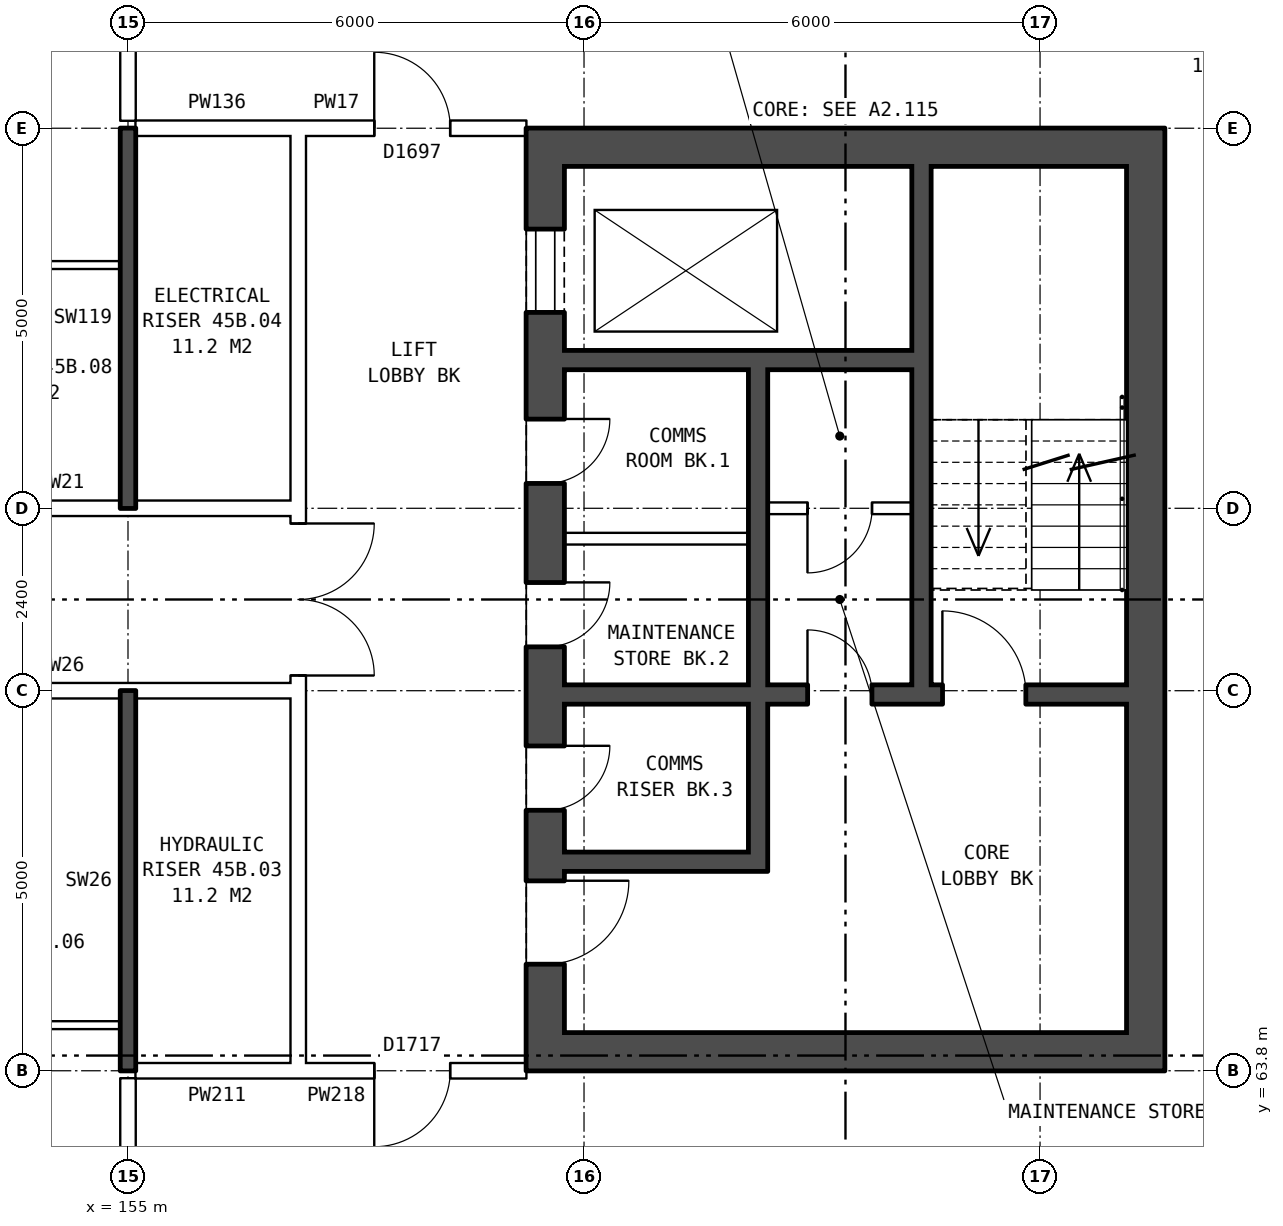
"""IFC4 building model, lengths in metres.
Left out: names, types, materials, properties, quantities, classifications, styles, units other than length and angle.
Written with IfcOpenShell. Run it as: python <this file> out.ifc"""

import sys

from ifc_helpers import new_model, si_unit, direction, frame, frame_2d, origin, place, context, subcontext, project, spatial, rectangle, extrude, element, fill, save


model = new_model("IFC4")
c1 = context("Model", 3, precision=1e-05, world=origin(), true_north=direction((0.0, 1.0)))
c2 = subcontext(c1, "Body", "Model", "MODEL_VIEW")
j1 = project(units=[si_unit("LENGTHUNIT", "METRE"), si_unit("PLANEANGLEUNIT", "RADIAN")], contexts=[c1])
p1 = place(None, origin())
s1 = spatial("IfcSite", under=j1, at=p1, CompositionType="ELEMENT")
p2 = place(p1, origin())
s2 = spatial("IfcBuilding", under=s1, at=p2, CompositionType="ELEMENT")
p3 = place(p2, frame((0.0, 0.0, 160.9)))
s3 = spatial("IfcBuildingStorey", under=s2, at=p3, CompositionType="ELEMENT", Elevation=160.9)
p4 = place(p3, frame((160.49, 76.2, 0.0), z_axis=(0.0, 0.0, 1.0), x_axis=(0.0, -1.0, 0.0)))
e1 = element("IfcWall", 1, at=p4, inside=s3, PredefinedType="SHEAR", context=c2, shape_type="SweptSolid", body=[
    extrude(rectangle(XDim=12.4, YDim=0.5, at=frame_2d((6.2, 0.0))), origin(), (0.0, 0.0, 1.0), 2.85),
])
p5 = place(p4, frame((1.325, 0.0, 0.0)))
e2 = element("IfcOpeningElement", 2, at=p5, cuts=e1, PredefinedType="OPENING", context=c2, shape_type="SweptSolid", body=[
    extrude(rectangle(XDim=1.1, YDim=2.1, at=frame_2d((0.55, 1.05))), frame((0.0, 0.26, 0.0), z_axis=(0.0, -1.0, 0.0), x_axis=(1.0, 0.0, 0.0)), (0.0, 0.0, 1.0), 0.52),
])
p6 = place(p4, frame((3.825, 0.0, 0.0)))
e3 = element("IfcOpeningElement", 3, at=p6, cuts=e1, PredefinedType="OPENING", context=c2, shape_type="SweptSolid", body=[
    extrude(rectangle(XDim=0.85, YDim=2.1, at=frame_2d((0.425, 1.05))), frame((0.0, 0.26, 0.0), z_axis=(0.0, -1.0, 0.0), x_axis=(1.0, 0.0, 0.0)), (0.0, 0.0, 1.0), 0.52),
])
p7 = place(p4, frame((5.975, 0.0, 0.0)))
e4 = element("IfcOpeningElement", 4, at=p7, cuts=e1, PredefinedType="OPENING", context=c2, shape_type="SweptSolid", body=[
    extrude(rectangle(XDim=0.85, YDim=2.1, at=frame_2d((0.425, 1.05))), frame((0.0, 0.26, 0.0), z_axis=(0.0, -1.0, 0.0), x_axis=(1.0, 0.0, 0.0)), (0.0, 0.0, 1.0), 0.52),
])
p8 = place(p4, frame((9.9, 0.0, 0.0)))
e5 = element("IfcOpeningElement", 5, at=p8, cuts=e1, PredefinedType="OPENING", context=c2, shape_type="SweptSolid", body=[
    extrude(rectangle(XDim=1.1, YDim=2.1, at=frame_2d((0.55, 1.05))), frame((0.0, 0.26, 0.0), z_axis=(0.0, -1.0, 0.0), x_axis=(1.0, 0.0, 0.0)), (0.0, 0.0, 1.0), 0.52),
])
p9 = place(p4, frame((8.125, 0.0, 0.0)))
e6 = element("IfcOpeningElement", 6, at=p9, cuts=e1, PredefinedType="OPENING", context=c2, shape_type="SweptSolid", body=[
    extrude(rectangle(XDim=0.85, YDim=2.1, at=frame_2d((0.425, 1.05))), frame((0.0, 0.26, 0.0), z_axis=(0.0, -1.0, 0.0), x_axis=(1.0, 0.0, 0.0)), (0.0, 0.0, 1.0), 0.52),
])
p10 = place(p3, frame((168.39, 76.2, 0.0), z_axis=(0.0, 0.0, 1.0), x_axis=(0.0, -1.0, 0.0)))
e7 = element("IfcWall", 7, at=p10, inside=s3, PredefinedType="SHEAR", context=c2, shape_type="SweptSolid", body=[
    extrude(rectangle(XDim=12.4, YDim=0.5, at=frame_2d((6.2, 0.0))), origin(), (0.0, 0.0, 1.0), 2.85),
])
for number, where, z_axis, x_axis in (
    (8, (160.74, 75.95, 0.0), (0.0, 0.0, 1.0), (1.0, 0.0, 0.0)),
    (9, (160.74, 64.05, 0.0), (0.0, 0.0, 1.0), (1.0, 0.0, 0.0)),
):
    element("IfcWall", number, at=place(p3, frame(where, z_axis=z_axis, x_axis=x_axis)), inside=s3, PredefinedType="SHEAR", context=c2, shape_type="SweptSolid", body=[
        extrude(rectangle(XDim=7.4, YDim=0.5, at=frame_2d((3.7, 0.0))), origin(), (0.0, 0.0, 1.0), 2.85),
    ])
p11 = place(p3, frame((160.74, 73.15, 0.0), z_axis=(0.0, 0.0, 1.0), x_axis=(1.0, 0.0, 0.0)))
e10 = element("IfcWall", 10, at=p11, inside=s3, PredefinedType="SHEAR", context=c2, shape_type="SweptSolid", body=[
    extrude(rectangle(XDim=4.575, YDim=0.25, at=frame_2d((2.288, 0.0))), origin(), (0.0, 0.0, 1.0), 2.85),
])
p12 = place(p3, frame((163.415, 71.2, 0.0), z_axis=(0.0, 0.0, 1.0), x_axis=(1.0, 0.0, 0.0)))
e11 = element("IfcWall", 11, at=p12, inside=s3, PredefinedType="PARTITIONING", context=c2, shape_type="SweptSolid", body=[
    extrude(rectangle(XDim=1.9, YDim=0.15, at=frame_2d((0.95, 0.0))), origin(), (0.0, 0.0, 1.0), 2.85),
])
p13 = place(p12, frame((0.525, 0.0, 0.0)))
e12 = element("IfcOpeningElement", 12, at=p13, cuts=e11, PredefinedType="OPENING", context=c2, shape_type="SweptSolid", body=[
    extrude(rectangle(XDim=0.85, YDim=2.1, at=frame_2d((0.425, 1.05))), frame((0.0, 0.085, 0.0), z_axis=(0.0, -1.0, 0.0), x_axis=(1.0, 0.0, 0.0)), (0.0, 0.0, 1.0), 0.17),
])
p14 = place(p3, frame((160.74, 70.8, 0.0), z_axis=(0.0, 0.0, 1.0), x_axis=(1.0, 0.0, 0.0)))
e13 = element("IfcWall", 13, at=p14, inside=s3, PredefinedType="PARTITIONING", context=c2, shape_type="SweptSolid", body=[
    extrude(rectangle(XDim=2.425, YDim=0.15, at=frame_2d((1.212, 0.0))), origin(), (0.0, 0.0, 1.0), 2.85),
])
p15 = place(p3, frame((160.74, 68.75, 0.0), z_axis=(0.0, 0.0, 1.0), x_axis=(1.0, 0.0, 0.0)))
e14 = element("IfcWall", 14, at=p15, inside=s3, PredefinedType="SHEAR", context=c2, shape_type="SweptSolid", body=[
    extrude(rectangle(XDim=7.4, YDim=0.25, at=frame_2d((3.7, 0.0))), origin(), (0.0, 0.0, 1.0), 2.85),
])
p16 = place(p15, frame((4.975, 0.0, 0.0)))
e15 = element("IfcOpeningElement", 15, at=p16, cuts=e14, PredefinedType="OPENING", context=c2, shape_type="SweptSolid", body=[
    extrude(rectangle(XDim=1.1, YDim=2.1, at=frame_2d((0.55, 1.05))), frame((0.0, 0.135, 0.0), z_axis=(0.0, -1.0, 0.0), x_axis=(1.0, 0.0, 0.0)), (0.0, 0.0, 1.0), 0.27),
])
p17 = place(p15, frame((3.2, 0.0, 0.0)))
e16 = element("IfcOpeningElement", 16, at=p17, cuts=e14, PredefinedType="OPENING", context=c2, shape_type="SweptSolid", body=[
    extrude(rectangle(XDim=0.85, YDim=2.1, at=frame_2d((0.425, 1.05))), frame((0.0, 0.135, 0.0), z_axis=(0.0, -1.0, 0.0), x_axis=(1.0, 0.0, 0.0)), (0.0, 0.0, 1.0), 0.27),
])
p18 = place(p3, frame((160.74, 66.55, 0.0), z_axis=(0.0, 0.0, 1.0), x_axis=(1.0, 0.0, 0.0)))
e17 = element("IfcWall", 17, at=p18, inside=s3, PredefinedType="SHEAR", context=c2, shape_type="SweptSolid", body=[
    extrude(rectangle(XDim=2.425, YDim=0.25, at=frame_2d((1.212, 0.0))), origin(), (0.0, 0.0, 1.0), 2.85),
])
p19 = place(p3, frame((163.29, 73.025, 0.0), z_axis=(0.0, 0.0, 1.0), x_axis=(0.0, -1.0, 0.0)))
e18 = element("IfcWall", 18, at=p19, inside=s3, PredefinedType="SHEAR", context=c2, shape_type="SweptSolid", body=[
    extrude(rectangle(XDim=4.15, YDim=0.25, at=frame_2d((2.075, 0.0))), origin(), (0.0, 0.0, 1.0), 2.85),
])
p20 = place(p3, frame((163.29, 68.625, 0.0), z_axis=(0.0, 0.0, 1.0), x_axis=(0.0, -1.0, 0.0)))
e19 = element("IfcWall", 19, at=p20, inside=s3, PredefinedType="SHEAR", context=c2, shape_type="SweptSolid", body=[
    extrude(rectangle(XDim=2.2, YDim=0.25, at=frame_2d((1.1, 0.0))), origin(), (0.0, 0.0, 1.0), 2.85),
])
p21 = place(p3, frame((165.44, 75.7, 0.0), z_axis=(0.0, 0.0, 1.0), x_axis=(0.0, -1.0, 0.0)))
e20 = element("IfcWall", 20, at=p21, inside=s3, PredefinedType="SHEAR", context=c2, shape_type="SweptSolid", body=[
    extrude(rectangle(XDim=6.825, YDim=0.25, at=frame_2d((3.413, 0.0))), origin(), (0.0, 0.0, 1.0), 2.85),
])
p22 = place(p3, frame((157.24, 63.9, 0.0), z_axis=(0.0, 0.0, 1.0), x_axis=(0.0, 1.0, 0.0)))
e21 = element("IfcWall", 21, at=p22, inside=s3, PredefinedType="PARTITIONING", context=c2, shape_type="SweptSolid", body=[
    extrude(rectangle(XDim=12.2, YDim=0.2, at=frame_2d((6.1, 0.0))), origin(), (0.0, 0.0, 1.0), 2.85),
])
p23 = place(p22, frame((5.1, 0.0, 0.0)))
e22 = element("IfcOpeningElement", 22, at=p23, cuts=e21, PredefinedType="OPENING", context=c2, shape_type="SweptSolid", body=[
    extrude(rectangle(XDim=2.0, YDim=2.1, at=frame_2d((1.0, 1.05))), frame((0.0, 0.11, 0.0), z_axis=(0.0, -1.0, 0.0), x_axis=(1.0, 0.0, 0.0)), (0.0, 0.0, 1.0), 0.22),
])
p24 = place(p3, frame((155.1, 63.8, 0.0), z_axis=(0.0, 0.0, 1.0), x_axis=(1.0, 0.0, 0.0)))
e23 = element("IfcWall", 23, at=p24, inside=s3, PredefinedType="PARTITIONING", context=c2, shape_type="SweptSolid", body=[
    extrude(rectangle(XDim=2.14, YDim=0.2, at=frame_2d((1.07, 0.0))), origin(), (0.0, 0.0, 1.0), 2.85),
])
p25 = place(p3, frame((157.24, 63.8, 0.0), z_axis=(0.0, 0.0, 1.0), x_axis=(1.0, 0.0, 0.0)))
e24 = element("IfcWall", 24, at=p25, inside=s3, PredefinedType="PARTITIONING", context=c2, shape_type="SweptSolid", body=[
    extrude(rectangle(XDim=3.0, YDim=0.2, at=frame_2d((1.5, 0.0))), origin(), (0.0, 0.0, 1.0), 2.85),
])
p26 = place(p25, frame((1.0, 0.0, 0.0)))
e25 = element("IfcOpeningElement", 25, at=p26, cuts=e24, PredefinedType="OPENING", context=c2, shape_type="SweptSolid", body=[
    extrude(rectangle(XDim=1.0, YDim=2.1, at=frame_2d((0.5, 1.05))), frame((0.0, 0.11, 0.0), z_axis=(0.0, -1.0, 0.0), x_axis=(1.0, 0.0, 0.0)), (0.0, 0.0, 1.0), 0.22),
])
p27 = place(p3, frame((152.0, 64.4, 0.0), z_axis=(0.0, 0.0, 1.0), x_axis=(1.0, 0.0, 0.0)))
e26 = element("IfcWall", 26, at=p27, inside=s3, PredefinedType="PARTITIONING", context=c2, shape_type="SweptSolid", body=[
    extrude(rectangle(XDim=2.9, YDim=0.1, at=frame_2d((1.45, 0.0))), origin(), (0.0, 0.0, 1.0), 2.85),
])
p28 = place(p3, frame((142.76, 68.8, 0.0), z_axis=(0.0, 0.0, 1.0), x_axis=(1.0, 0.0, 0.0)))
e27 = element("IfcWall", 27, at=p28, inside=s3, PredefinedType="PARTITIONING", context=c2, shape_type="SweptSolid", body=[
    extrude(rectangle(XDim=14.48, YDim=0.2, at=frame_2d((7.24, 0.0))), origin(), (0.0, 0.0, 1.0), 2.85),
])
p29 = place(p28, frame((1.12, 0.0, 0.0)))
e28 = element("IfcOpeningElement", 28, at=p29, cuts=e27, PredefinedType="OPENING", context=c2, shape_type="SweptSolid", body=[
    extrude(rectangle(XDim=1.0, YDim=2.1, at=frame_2d((0.5, 1.05))), frame((0.0, 0.11, 0.0), z_axis=(0.0, -1.0, 0.0), x_axis=(1.0, 0.0, 0.0)), (0.0, 0.0, 1.0), 0.22),
])
p30 = place(p28, frame((7.24, 0.0, 0.0)))
e29 = element("IfcOpeningElement", 29, at=p30, cuts=e27, PredefinedType="OPENING", context=c2, shape_type="SweptSolid", body=[
    extrude(rectangle(XDim=1.0, YDim=2.1, at=frame_2d((0.5, 1.05))), frame((0.0, 0.11, 0.0), z_axis=(0.0, -1.0, 0.0), x_axis=(1.0, 0.0, 0.0)), (0.0, 0.0, 1.0), 0.22),
])
p31 = place(p3, frame((142.76, 71.2, 0.0), z_axis=(0.0, 0.0, 1.0), x_axis=(1.0, 0.0, 0.0)))
e30 = element("IfcWall", 30, at=p31, inside=s3, PredefinedType="PARTITIONING", context=c2, shape_type="SweptSolid", body=[
    extrude(rectangle(XDim=14.48, YDim=0.2, at=frame_2d((7.24, 0.0))), origin(), (0.0, 0.0, 1.0), 2.85),
])
p32 = place(p31, frame((4.24, 0.0, 0.0)))
e31 = element("IfcOpeningElement", 31, at=p32, cuts=e30, PredefinedType="OPENING", context=c2, shape_type="SweptSolid", body=[
    extrude(rectangle(XDim=1.0, YDim=2.1, at=frame_2d((0.5, 1.05))), frame((0.0, 0.11, 0.0), z_axis=(0.0, -1.0, 0.0), x_axis=(1.0, 0.0, 0.0)), (0.0, 0.0, 1.0), 0.22),
])
p33 = place(p31, frame((7.24, 0.0, 0.0)))
e32 = element("IfcOpeningElement", 32, at=p33, cuts=e30, PredefinedType="OPENING", context=c2, shape_type="SweptSolid", body=[
    extrude(rectangle(XDim=1.0, YDim=2.1, at=frame_2d((0.5, 1.05))), frame((0.0, 0.11, 0.0), z_axis=(0.0, -1.0, 0.0), x_axis=(1.0, 0.0, 0.0)), (0.0, 0.0, 1.0), 0.22),
])
p34 = place(p3, frame((152.0, 74.4, 0.0), z_axis=(0.0, 0.0, 1.0), x_axis=(1.0, 0.0, 0.0)))
e33 = element("IfcWall", 33, at=p34, inside=s3, PredefinedType="PARTITIONING", context=c2, shape_type="SweptSolid", body=[
    extrude(rectangle(XDim=2.9, YDim=0.1, at=frame_2d((1.45, 0.0))), origin(), (0.0, 0.0, 1.0), 2.85),
])
p35 = place(p3, frame((155.1, 76.2, 0.0), z_axis=(0.0, 0.0, 1.0), x_axis=(1.0, 0.0, 0.0)))
e34 = element("IfcWall", 34, at=p35, inside=s3, PredefinedType="PARTITIONING", context=c2, shape_type="SweptSolid", body=[
    extrude(rectangle(XDim=2.14, YDim=0.2, at=frame_2d((1.07, 0.0))), origin(), (0.0, 0.0, 1.0), 2.85),
])
p36 = place(p3, frame((157.24, 76.2, 0.0), z_axis=(0.0, 0.0, 1.0), x_axis=(1.0, 0.0, 0.0)))
e35 = element("IfcWall", 35, at=p36, inside=s3, PredefinedType="PARTITIONING", context=c2, shape_type="SweptSolid", body=[
    extrude(rectangle(XDim=3.0, YDim=0.2, at=frame_2d((1.5, 0.0))), origin(), (0.0, 0.0, 1.0), 2.85),
])
p37 = place(p36, frame((1.0, 0.0, 0.0)))
e36 = element("IfcOpeningElement", 36, at=p37, cuts=e35, PredefinedType="OPENING", context=c2, shape_type="SweptSolid", body=[
    extrude(rectangle(XDim=1.0, YDim=2.1, at=frame_2d((0.5, 1.05))), frame((0.0, 0.11, 0.0), z_axis=(0.0, -1.0, 0.0), x_axis=(1.0, 0.0, 0.0)), (0.0, 0.0, 1.0), 0.22),
])
p38 = place(p3, frame((155.0, 61.5, 0.0), z_axis=(0.0, 0.0, 1.0), x_axis=(0.0, 1.0, 0.0)))
e37 = element("IfcWall", 37, at=p38, inside=s3, PredefinedType="PARTITIONING", context=c2, shape_type="SweptSolid", body=[
    extrude(rectangle(XDim=2.2, YDim=0.2, at=frame_2d((1.1, 0.0))), origin(), (0.0, 0.0, 1.0), 2.85),
])
for number, where, z_axis, x_axis in (
    (38, (155.0, 63.8, 0.0), (0.0, 0.0, 1.0), (0.0, 1.0, 0.0)),
    (39, (155.0, 71.2, 0.0), (0.0, 0.0, 1.0), (0.0, 1.0, 0.0)),
):
    element("IfcWall", number, at=place(p3, frame(where, z_axis=z_axis, x_axis=x_axis)), inside=s3, PredefinedType="SOLIDWALL", context=c2, shape_type="SweptSolid", body=[
        extrude(rectangle(XDim=5.0, YDim=0.2, at=frame_2d((2.5, 0.0))), origin(), (0.0, 0.0, 1.0), 2.85),
    ])
p39 = place(p3, frame((155.0, 76.3, 0.0), z_axis=(0.0, 0.0, 1.0), x_axis=(0.0, 1.0, 0.0)))
e40 = element("IfcWall", 40, at=p39, inside=s3, PredefinedType="PARTITIONING", context=c2, shape_type="SweptSolid", body=[
    extrude(rectangle(XDim=2.2, YDim=0.2, at=frame_2d((1.1, 0.0))), origin(), (0.0, 0.0, 1.0), 2.85),
])
p40 = place(p5, origin())
e41 = element("IfcDoor", 41, at=p40, inside=s3, OperationType="DOUBLE_DOOR_SLIDING", PredefinedType="DOOR", context=c2, shape_type="SweptSolid", body=[
    extrude(rectangle(XDim=1.1, YDim=2.1, at=frame_2d((0.55, 1.05))), frame((0.0, 0.235, 0.0), z_axis=(0.0, -1.0, 0.0), x_axis=(1.0, 0.0, 0.0)), (0.0, 0.0, 1.0), 0.05),
])
fill(e2, e41)
p41 = place(p6, origin())
e42 = element("IfcDoor", 42, at=p41, inside=s3, OperationType="SINGLE_SWING_LEFT", PredefinedType="DOOR", context=c2, shape_type="SweptSolid", body=[
    extrude(rectangle(XDim=0.85, YDim=2.1, at=frame_2d((0.425, 1.05))), frame((0.0, 0.235, 0.0), z_axis=(0.0, -1.0, 0.0), x_axis=(1.0, 0.0, 0.0)), (0.0, 0.0, 1.0), 0.05),
])
fill(e3, e42)
p42 = place(p7, origin())
e43 = element("IfcDoor", 43, at=p42, inside=s3, OperationType="SINGLE_SWING_LEFT", PredefinedType="DOOR", context=c2, shape_type="SweptSolid", body=[
    extrude(rectangle(XDim=0.85, YDim=2.1, at=frame_2d((0.425, 1.05))), frame((0.0, 0.235, 0.0), z_axis=(0.0, -1.0, 0.0), x_axis=(1.0, 0.0, 0.0)), (0.0, 0.0, 1.0), 0.05),
])
fill(e4, e43)
p43 = place(p8, origin())
e44 = element("IfcDoor", 44, at=p43, inside=s3, OperationType="SINGLE_SWING_LEFT", PredefinedType="DOOR", context=c2, shape_type="SweptSolid", body=[
    extrude(rectangle(XDim=1.1, YDim=2.1, at=frame_2d((0.55, 1.05))), frame((0.0, 0.235, 0.0), z_axis=(0.0, -1.0, 0.0), x_axis=(1.0, 0.0, 0.0)), (0.0, 0.0, 1.0), 0.05),
])
fill(e5, e44)
p44 = place(p16, origin())
e45 = element("IfcDoor", 45, at=p44, inside=s3, OperationType="SINGLE_SWING_LEFT", PredefinedType="DOOR", context=c2, shape_type="SweptSolid", body=[
    extrude(rectangle(XDim=1.1, YDim=2.1, at=frame_2d((0.55, 1.05))), frame((0.0, 0.025, 0.0), z_axis=(0.0, -1.0, 0.0), x_axis=(1.0, 0.0, 0.0)), (0.0, 0.0, 1.0), 0.05),
])
fill(e15, e45)
p45 = place(p9, origin())
e46 = element("IfcDoor", 46, at=p45, inside=s3, OperationType="SINGLE_SWING_LEFT", PredefinedType="DOOR", context=c2, shape_type="SweptSolid", body=[
    extrude(rectangle(XDim=0.85, YDim=2.1, at=frame_2d((0.425, 1.05))), frame((0.0, 0.235, 0.0), z_axis=(0.0, -1.0, 0.0), x_axis=(1.0, 0.0, 0.0)), (0.0, 0.0, 1.0), 0.05),
])
fill(e6, e46)
p46 = place(p17, origin())
e47 = element("IfcDoor", 47, at=p46, inside=s3, OperationType="SINGLE_SWING_LEFT", PredefinedType="DOOR", context=c2, shape_type="SweptSolid", body=[
    extrude(rectangle(XDim=0.85, YDim=2.1, at=frame_2d((0.425, 1.05))), frame((0.0, 0.025, 0.0), z_axis=(0.0, -1.0, 0.0), x_axis=(1.0, 0.0, 0.0)), (0.0, 0.0, 1.0), 0.05),
])
fill(e16, e47)
p47 = place(p13, frame((0.85, 0.0, 0.0), z_axis=(0.0, 0.0, 1.0), x_axis=(-1.0, 0.0, 0.0)))
e48 = element("IfcDoor", 48, at=p47, inside=s3, OperationType="SINGLE_SWING_RIGHT", PredefinedType="DOOR", context=c2, shape_type="SweptSolid", body=[
    extrude(rectangle(XDim=0.85, YDim=2.1, at=frame_2d((0.425, 1.05))), frame((0.0, 0.025, 0.0), z_axis=(0.0, -1.0, 0.0), x_axis=(1.0, 0.0, 0.0)), (0.0, 0.0, 1.0), 0.05),
])
fill(e12, e48)
p48 = place(p23, frame((2.0, 0.0, 0.0), z_axis=(0.0, 0.0, 1.0), x_axis=(-1.0, 0.0, 0.0)))
e49 = element("IfcDoor", 49, at=p48, inside=s3, OperationType="DOUBLE_DOOR_SINGLE_SWING", PredefinedType="DOOR", context=c2, shape_type="SweptSolid", body=[
    extrude(rectangle(XDim=2.0, YDim=2.1, at=frame_2d((1.0, 1.05))), frame((0.0, 0.025, 0.0), z_axis=(0.0, -1.0, 0.0), x_axis=(1.0, 0.0, 0.0)), (0.0, 0.0, 1.0), 0.05),
])
fill(e22, e49)
p49 = place(p26, frame((1.0, 0.0, 0.0), z_axis=(0.0, 0.0, 1.0), x_axis=(-1.0, 0.0, 0.0)))
e50 = element("IfcDoor", 50, at=p49, inside=s3, OperationType="SINGLE_SWING_RIGHT", PredefinedType="DOOR", context=c2, shape_type="SweptSolid", body=[
    extrude(rectangle(XDim=1.0, YDim=2.1, at=frame_2d((0.5, 1.05))), frame((0.0, 0.025, 0.0), z_axis=(0.0, -1.0, 0.0), x_axis=(1.0, 0.0, 0.0)), (0.0, 0.0, 1.0), 0.05),
])
fill(e25, e50)
p50 = place(p37, origin())
e51 = element("IfcDoor", 51, at=p50, inside=s3, OperationType="SINGLE_SWING_LEFT", PredefinedType="DOOR", context=c2, shape_type="SweptSolid", body=[
    extrude(rectangle(XDim=1.0, YDim=2.1, at=frame_2d((0.5, 1.05))), frame((0.0, 0.025, 0.0), z_axis=(0.0, -1.0, 0.0), x_axis=(1.0, 0.0, 0.0)), (0.0, 0.0, 1.0), 0.05),
])
fill(e36, e51)
save(model, sys.argv[1])
